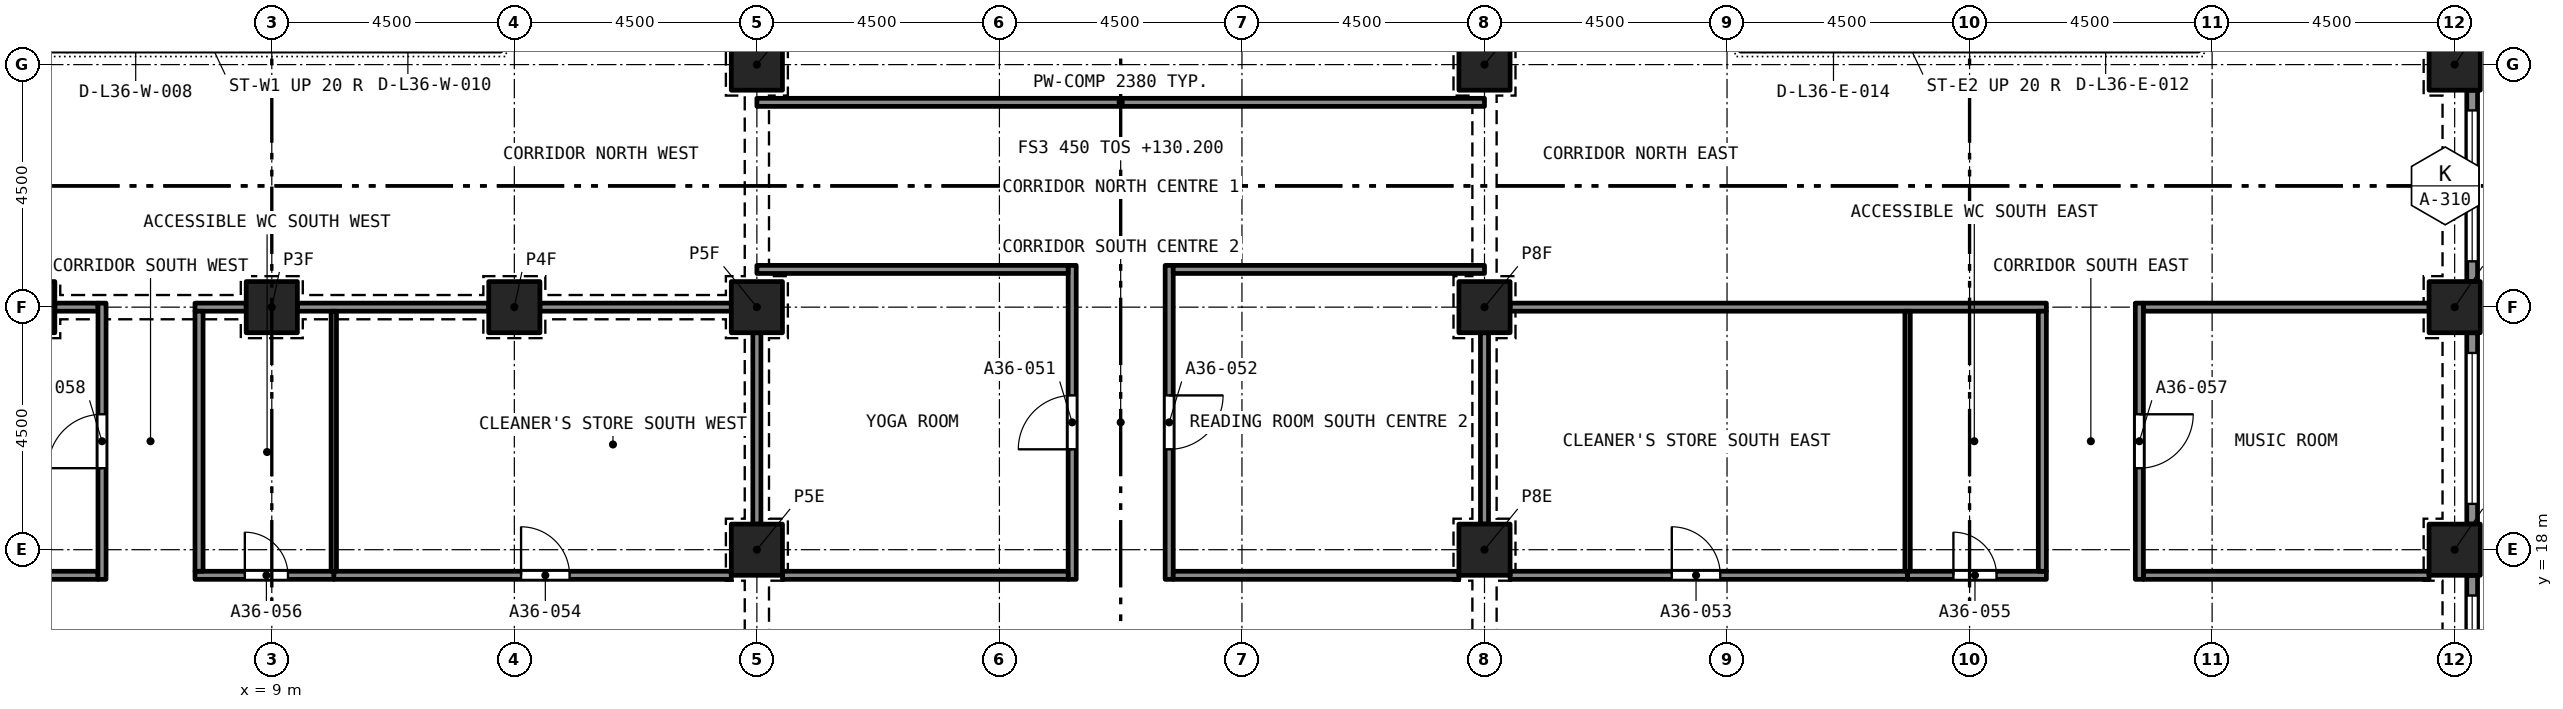
"""IFC4 building model, lengths in metres.
Left out: names, types, materials, properties, quantities, classifications, styles, units other than length and angle.
Written with IfcOpenShell. Run it as: python <this file> out.ifc"""

import sys

from ifc_helpers import new_model, si_unit, direction, frame, frame_2d, origin, origin_2d, place, context, subcontext, project, spatial, rectangle, extrude, element, fill, save


model = new_model("IFC4")
c1 = context("Model", 3, precision=1e-05, world=origin(), true_north=direction((0.0, 1.0)))
c2 = subcontext(c1, "Body", "Model", "MODEL_VIEW")
j1 = project(units=[si_unit("LENGTHUNIT", "METRE"), si_unit("PLANEANGLEUNIT", "RADIAN")], contexts=[c1])
p1 = place(None, origin())
s1 = spatial("IfcSite", under=j1, at=p1, CompositionType="ELEMENT")
p2 = place(p1, origin())
s2 = spatial("IfcBuilding", under=s1, at=p2, CompositionType="ELEMENT")
p3 = place(p2, frame((0.0, 0.0, 130.2)))
s3 = spatial("IfcBuildingStorey", under=s2, at=p3, CompositionType="ELEMENT", Elevation=130.2)
for number, where, z_axis, x_axis in (
    (1, (18.0, 18.0, 0.0), (0.0, 0.0, 1.0), (1.0, 0.0, 0.0)),
    (2, (31.5, 18.0, 0.0), (0.0, 0.0, 1.0), (1.0, 0.0, 0.0)),
    (3, (49.5, 18.0, 0.0), (0.0, 0.0, 1.0), (1.0, 0.0, 0.0)),
    (4, (4.5, 22.5, 0.0), (0.0, 0.0, 1.0), (1.0, 0.0, 0.0)),
    (5, (9.0, 22.5, 0.0), (0.0, 0.0, 1.0), (1.0, 0.0, 0.0)),
    (6, (13.5, 22.5, 0.0), (0.0, 0.0, 1.0), (1.0, 0.0, 0.0)),
    (7, (18.0, 22.5, 0.0), (0.0, 0.0, 1.0), (1.0, 0.0, 0.0)),
    (8, (31.5, 22.5, 0.0), (0.0, 0.0, 1.0), (1.0, 0.0, 0.0)),
    (9, (49.5, 22.5, 0.0), (0.0, 0.0, 1.0), (1.0, 0.0, 0.0)),
    (10, (18.0, 27.0, 0.0), (0.0, 0.0, 1.0), (1.0, 0.0, 0.0)),
    (11, (31.5, 27.0, 0.0), (0.0, 0.0, 1.0), (1.0, 0.0, 0.0)),
    (12, (49.5, 27.0, 0.0), (0.0, 0.0, 1.0), (1.0, 0.0, 0.0)),
):
    element("IfcColumn", number, at=place(p3, frame(where, z_axis=z_axis, x_axis=x_axis)), inside=s3, PredefinedType="COLUMN", context=c2, shape_type="SweptSolid", body=[
        extrude(rectangle(XDim=0.95, YDim=0.95, at=origin_2d()), origin(), (0.0, 0.0, 1.0), 3.2),
    ])
p4 = place(p3, frame((49.825, 17.525, 0.0), z_axis=(0.0, 0.0, 1.0), x_axis=(0.0, -1.0, 0.0)))
e13 = element("IfcWall", 13, at=p4, inside=s3, PredefinedType="SOLIDWALL", context=c2, shape_type="SweptSolid", body=[
    extrude(rectangle(XDim=3.55, YDim=0.2, at=frame_2d((1.775, 0.0))), origin(), (0.0, 0.0, 1.0), 3.2),
])
p5 = place(p4, frame((0.375, 0.0, 0.45)))
e14 = element("IfcOpeningElement", 14, at=p5, cuts=e13, PredefinedType="OPENING", context=c2, shape_type="SweptSolid", body=[
    extrude(rectangle(XDim=2.8, YDim=1.95, at=frame_2d((1.4, 0.975))), frame((0.0, 0.11, 0.0), z_axis=(0.0, -1.0, 0.0), x_axis=(1.0, 0.0, 0.0)), (0.0, 0.0, 1.0), 0.22),
])
p6 = place(p3, frame((49.825, 22.025, 0.0), z_axis=(0.0, 0.0, 1.0), x_axis=(0.0, -1.0, 0.0)))
e15 = element("IfcWall", 15, at=p6, inside=s3, PredefinedType="SOLIDWALL", context=c2, shape_type="SweptSolid", body=[
    extrude(rectangle(XDim=3.55, YDim=0.2, at=frame_2d((1.775, 0.0))), origin(), (0.0, 0.0, 1.0), 3.2),
])
p7 = place(p6, frame((0.375, 0.0, 0.45)))
e16 = element("IfcOpeningElement", 16, at=p7, cuts=e15, PredefinedType="OPENING", context=c2, shape_type="SweptSolid", body=[
    extrude(rectangle(XDim=2.8, YDim=1.95, at=frame_2d((1.4, 0.975))), frame((0.0, 0.11, 0.0), z_axis=(0.0, -1.0, 0.0), x_axis=(1.0, 0.0, 0.0)), (0.0, 0.0, 1.0), 0.22),
])
p8 = place(p3, frame((49.825, 26.525, 0.0), z_axis=(0.0, 0.0, 1.0), x_axis=(0.0, -1.0, 0.0)))
e17 = element("IfcWall", 17, at=p8, inside=s3, PredefinedType="SOLIDWALL", context=c2, shape_type="SweptSolid", body=[
    extrude(rectangle(XDim=3.55, YDim=0.2, at=frame_2d((1.775, 0.0))), origin(), (0.0, 0.0, 1.0), 3.2),
])
p9 = place(p8, frame((0.375, 0.0, 0.45)))
e18 = element("IfcOpeningElement", 18, at=p9, cuts=e17, PredefinedType="OPENING", context=c2, shape_type="SweptSolid", body=[
    extrude(rectangle(XDim=2.8, YDim=1.95, at=frame_2d((1.4, 0.975))), frame((0.0, 0.11, 0.0), z_axis=(0.0, -1.0, 0.0), x_axis=(1.0, 0.0, 0.0)), (0.0, 0.0, 1.0), 0.22),
])
p10 = place(p3, frame((23.85, 17.45, 0.0), z_axis=(0.0, 0.0, 1.0), x_axis=(0.0, 1.0, 0.0)))
e19 = element("IfcWall", 19, at=p10, inside=s3, PredefinedType="PARTITIONING", context=c2, shape_type="SweptSolid", body=[
    extrude(rectangle(XDim=5.825, YDim=0.15, at=frame_2d((2.913, 0.0))), origin(), (0.0, 0.0, 1.0), 2.75),
])
p11 = place(p10, frame((2.413, 0.0, 0.0)))
e20 = element("IfcOpeningElement", 20, at=p11, cuts=e19, PredefinedType="OPENING", context=c2, shape_type="SweptSolid", body=[
    extrude(rectangle(XDim=1.0, YDim=2.1, at=frame_2d((0.5, 1.05))), frame((0.0, 0.085, 0.0), z_axis=(0.0, -1.0, 0.0), x_axis=(1.0, 0.0, 0.0)), (0.0, 0.0, 1.0), 0.17),
])
p12 = place(p3, frame((25.65, 23.275, 0.0), z_axis=(0.0, 0.0, 1.0), x_axis=(0.0, -1.0, 0.0)))
e21 = element("IfcWall", 21, at=p12, inside=s3, PredefinedType="PARTITIONING", context=c2, shape_type="SweptSolid", body=[
    extrude(rectangle(XDim=5.825, YDim=0.15, at=frame_2d((2.913, 0.0))), origin(), (0.0, 0.0, 1.0), 2.75),
])
p13 = place(p12, frame((2.413, 0.0, 0.0)))
e22 = element("IfcOpeningElement", 22, at=p13, cuts=e21, PredefinedType="OPENING", context=c2, shape_type="SweptSolid", body=[
    extrude(rectangle(XDim=1.0, YDim=2.1, at=frame_2d((0.5, 1.05))), frame((0.0, 0.085, 0.0), z_axis=(0.0, -1.0, 0.0), x_axis=(1.0, 0.0, 0.0)), (0.0, 0.0, 1.0), 0.17),
])
for number, where, z_axis, x_axis in (
    (23, (18.475, 17.525, 0.0), (0.0, 0.0, 1.0), (1.0, 0.0, 0.0)),
    (24, (25.725, 17.525, 0.0), (0.0, 0.0, 1.0), (1.0, 0.0, 0.0)),
):
    element("IfcWall", number, at=place(p3, frame(where, z_axis=z_axis, x_axis=x_axis)), inside=s3, PredefinedType="PARTITIONING", context=c2, shape_type="SweptSolid", body=[
        extrude(rectangle(XDim=5.3, YDim=0.15, at=frame_2d((2.65, 0.0))), origin(), (0.0, 0.0, 1.0), 2.75),
    ])
p14 = place(p3, frame((31.975, 17.525, 0.0), z_axis=(0.0, 0.0, 1.0), x_axis=(1.0, 0.0, 0.0)))
e25 = element("IfcWall", 25, at=p14, inside=s3, PredefinedType="PARTITIONING", context=c2, shape_type="SweptSolid", body=[
    extrude(rectangle(XDim=7.375, YDim=0.15, at=frame_2d((3.688, 0.0))), origin(), (0.0, 0.0, 1.0), 2.9),
])
p15 = place(p14, frame((3.0, 0.0, 0.0)))
e26 = element("IfcOpeningElement", 26, at=p15, cuts=e25, PredefinedType="OPENING", context=c2, shape_type="SweptSolid", body=[
    extrude(rectangle(XDim=0.9, YDim=2.1, at=frame_2d((0.45, 1.05))), frame((0.0, 0.085, 0.0), z_axis=(0.0, -1.0, 0.0), x_axis=(1.0, 0.0, 0.0)), (0.0, 0.0, 1.0), 0.17),
])
p16 = place(p3, frame((10.15, 17.525, 0.0), z_axis=(0.0, 0.0, 1.0), x_axis=(1.0, 0.0, 0.0)))
e27 = element("IfcWall", 27, at=p16, inside=s3, PredefinedType="PARTITIONING", context=c2, shape_type="SweptSolid", body=[
    extrude(rectangle(XDim=7.375, YDim=0.15, at=frame_2d((3.688, 0.0))), origin(), (0.0, 0.0, 1.0), 2.9),
])
p17 = place(p16, frame((3.475, 0.0, 0.0)))
e28 = element("IfcOpeningElement", 28, at=p17, cuts=e27, PredefinedType="OPENING", context=c2, shape_type="SweptSolid", body=[
    extrude(rectangle(XDim=0.9, YDim=2.1, at=frame_2d((0.45, 1.05))), frame((0.0, 0.085, 0.0), z_axis=(0.0, -1.0, 0.0), x_axis=(1.0, 0.0, 0.0)), (0.0, 0.0, 1.0), 0.17),
])
p18 = place(p3, frame((39.35, 17.525, 0.0), z_axis=(0.0, 0.0, 1.0), x_axis=(1.0, 0.0, 0.0)))
e29 = element("IfcWall", 29, at=p18, inside=s3, PredefinedType="PARTITIONING", context=c2, shape_type="SweptSolid", body=[
    extrude(rectangle(XDim=2.575, YDim=0.15, at=frame_2d((1.288, 0.0))), origin(), (0.0, 0.0, 1.0), 2.9),
])
p19 = place(p18, frame((0.85, 0.0, 0.0)))
e30 = element("IfcOpeningElement", 30, at=p19, cuts=e29, PredefinedType="OPENING", context=c2, shape_type="SweptSolid", body=[
    extrude(rectangle(XDim=0.8, YDim=2.1, at=frame_2d((0.4, 1.05))), frame((0.0, 0.085, 0.0), z_axis=(0.0, -1.0, 0.0), x_axis=(1.0, 0.0, 0.0)), (0.0, 0.0, 1.0), 0.17),
])
p20 = place(p3, frame((7.575, 17.525, 0.0), z_axis=(0.0, 0.0, 1.0), x_axis=(1.0, 0.0, 0.0)))
e31 = element("IfcWall", 31, at=p20, inside=s3, PredefinedType="PARTITIONING", context=c2, shape_type="SweptSolid", body=[
    extrude(rectangle(XDim=2.575, YDim=0.15, at=frame_2d((1.288, 0.0))), origin(), (0.0, 0.0, 1.0), 2.9),
])
p21 = place(p20, frame((0.925, 0.0, 0.0)))
e32 = element("IfcOpeningElement", 32, at=p21, cuts=e31, PredefinedType="OPENING", context=c2, shape_type="SweptSolid", body=[
    extrude(rectangle(XDim=0.8, YDim=2.1, at=frame_2d((0.4, 1.05))), frame((0.0, 0.085, 0.0), z_axis=(0.0, -1.0, 0.0), x_axis=(1.0, 0.0, 0.0)), (0.0, 0.0, 1.0), 0.17),
])
for number, where, z_axis, x_axis in (
    (33, (43.725, 17.525, 0.0), (0.0, 0.0, 1.0), (1.0, 0.0, 0.0)),
    (34, (0.475, 17.525, 0.0), (0.0, 0.0, 1.0), (1.0, 0.0, 0.0)),
):
    element("IfcWall", number, at=place(p3, frame(where, z_axis=z_axis, x_axis=x_axis)), inside=s3, PredefinedType="PARTITIONING", context=c2, shape_type="SweptSolid", body=[
        extrude(rectangle(XDim=5.3, YDim=0.15, at=frame_2d((2.65, 0.0))), origin(), (0.0, 0.0, 1.0), 2.9),
    ])
p22 = place(p3, frame((18.0, 26.3, 0.0), z_axis=(0.0, 0.0, 1.0), x_axis=(1.0, 0.0, 0.0)))
e35 = element("IfcWall", 35, at=p22, inside=s3, PredefinedType="PARTITIONING", context=c2, shape_type="SweptSolid", body=[
    extrude(rectangle(XDim=13.5, YDim=0.15, at=frame_2d((6.75, 0.0))), origin(), (0.0, 0.0, 1.0), 2.38),
])
p23 = place(p3, frame((18.0, 23.2, 0.0), z_axis=(0.0, 0.0, 1.0), x_axis=(1.0, 0.0, 0.0)))
e36 = element("IfcWall", 36, at=p23, inside=s3, PredefinedType="PARTITIONING", context=c2, shape_type="SweptSolid", body=[
    extrude(rectangle(XDim=5.775, YDim=0.15, at=frame_2d((2.887, 0.0))), origin(), (0.0, 0.0, 1.0), 2.75),
])
p24 = place(p3, frame((18.0, 18.475, 0.0), z_axis=(0.0, 0.0, 1.0), x_axis=(0.0, 1.0, 0.0)))
e37 = element("IfcWall", 37, at=p24, inside=s3, PredefinedType="PARTITIONING", context=c2, shape_type="SweptSolid", body=[
    extrude(rectangle(XDim=3.55, YDim=0.15, at=frame_2d((1.775, 0.0))), origin(), (0.0, 0.0, 1.0), 2.38),
])
p25 = place(p3, frame((25.725, 23.2, 0.0), z_axis=(0.0, 0.0, 1.0), x_axis=(1.0, 0.0, 0.0)))
e38 = element("IfcWall", 38, at=p25, inside=s3, PredefinedType="PARTITIONING", context=c2, shape_type="SweptSolid", body=[
    extrude(rectangle(XDim=5.775, YDim=0.15, at=frame_2d((2.887, 0.0))), origin(), (0.0, 0.0, 1.0), 2.75),
])
p26 = place(p3, frame((31.5, 18.475, 0.0), z_axis=(0.0, 0.0, 1.0), x_axis=(0.0, 1.0, 0.0)))
e39 = element("IfcWall", 39, at=p26, inside=s3, PredefinedType="PARTITIONING", context=c2, shape_type="SweptSolid", body=[
    extrude(rectangle(XDim=3.55, YDim=0.15, at=frame_2d((1.775, 0.0))), origin(), (0.0, 0.0, 1.0), 2.38),
])
p27 = place(p3, frame((31.975, 22.5, 0.0), z_axis=(0.0, 0.0, 1.0), x_axis=(1.0, 0.0, 0.0)))
e40 = element("IfcWall", 40, at=p27, inside=s3, PredefinedType="PARTITIONING", context=c2, shape_type="SweptSolid", body=[
    extrude(rectangle(XDim=9.95, YDim=0.15, at=frame_2d((4.975, 0.0))), origin(), (0.0, 0.0, 1.0), 2.9),
])
p28 = place(p3, frame((43.725, 22.5, 0.0), z_axis=(0.0, 0.0, 1.0), x_axis=(1.0, 0.0, 0.0)))
e41 = element("IfcWall", 41, at=p28, inside=s3, PredefinedType="PARTITIONING", context=c2, shape_type="SweptSolid", body=[
    extrude(rectangle(XDim=5.3, YDim=0.15, at=frame_2d((2.65, 0.0))), origin(), (0.0, 0.0, 1.0), 2.9),
])
for number, where, z_axis, x_axis in (
    (42, (13.975, 22.5, 0.0), (0.0, 0.0, 1.0), (1.0, 0.0, 0.0)),
    (43, (9.475, 22.5, 0.0), (0.0, 0.0, 1.0), (1.0, 0.0, 0.0)),
):
    element("IfcWall", number, at=place(p3, frame(where, z_axis=z_axis, x_axis=x_axis)), inside=s3, PredefinedType="PARTITIONING", context=c2, shape_type="SweptSolid", body=[
        extrude(rectangle(XDim=3.55, YDim=0.15, at=frame_2d((1.775, 0.0))), origin(), (0.0, 0.0, 1.0), 2.38),
    ])
p29 = place(p3, frame((7.575, 22.5, 0.0), z_axis=(0.0, 0.0, 1.0), x_axis=(1.0, 0.0, 0.0)))
e44 = element("IfcWall", 44, at=p29, inside=s3, PredefinedType="PARTITIONING", context=c2, shape_type="SweptSolid", body=[
    extrude(rectangle(XDim=0.95, YDim=0.15, at=frame_2d((0.475, 0.0))), origin(), (0.0, 0.0, 1.0), 2.38),
])
p30 = place(p3, frame((4.975, 22.5, 0.0), z_axis=(0.0, 0.0, 1.0), x_axis=(1.0, 0.0, 0.0)))
e45 = element("IfcWall", 45, at=p30, inside=s3, PredefinedType="PARTITIONING", context=c2, shape_type="SweptSolid", body=[
    extrude(rectangle(XDim=0.8, YDim=0.15, at=frame_2d((0.4, 0.0))), origin(), (0.0, 0.0, 1.0), 2.38),
])
p31 = place(p3, frame((41.85, 17.6, 0.0), z_axis=(0.0, 0.0, 1.0), x_axis=(0.0, 1.0, 0.0)))
e46 = element("IfcWall", 46, at=p31, inside=s3, PredefinedType="PARTITIONING", context=c2, shape_type="SweptSolid", body=[
    extrude(rectangle(XDim=4.825, YDim=0.15, at=frame_2d((2.413, 0.0))), origin(), (0.0, 0.0, 1.0), 2.9),
])
p32 = place(p3, frame((43.65, 22.575, 0.0), z_axis=(0.0, 0.0, 1.0), x_axis=(0.0, -1.0, 0.0)))
e47 = element("IfcWall", 47, at=p32, inside=s3, PredefinedType="PARTITIONING", context=c2, shape_type="SweptSolid", body=[
    extrude(rectangle(XDim=5.125, YDim=0.15, at=frame_2d((2.562, 0.0))), origin(), (0.0, 0.0, 1.0), 2.9),
])
p33 = place(p32, frame((2.062, 0.0, 0.0)))
e48 = element("IfcOpeningElement", 48, at=p33, cuts=e47, PredefinedType="OPENING", context=c2, shape_type="SweptSolid", body=[
    extrude(rectangle(XDim=1.0, YDim=2.1, at=frame_2d((0.5, 1.05))), frame((0.0, 0.085, 0.0), z_axis=(0.0, -1.0, 0.0), x_axis=(1.0, 0.0, 0.0)), (0.0, 0.0, 1.0), 0.17),
])
p34 = place(p3, frame((7.65, 17.6, 0.0), z_axis=(0.0, 0.0, 1.0), x_axis=(0.0, 1.0, 0.0)))
e49 = element("IfcWall", 49, at=p34, inside=s3, PredefinedType="PARTITIONING", context=c2, shape_type="SweptSolid", body=[
    extrude(rectangle(XDim=4.825, YDim=0.15, at=frame_2d((2.413, 0.0))), origin(), (0.0, 0.0, 1.0), 2.9),
])
p35 = place(p3, frame((5.85, 17.45, 0.0), z_axis=(0.0, 0.0, 1.0), x_axis=(0.0, 1.0, 0.0)))
e50 = element("IfcWall", 50, at=p35, inside=s3, PredefinedType="PARTITIONING", context=c2, shape_type="SweptSolid", body=[
    extrude(rectangle(XDim=5.125, YDim=0.15, at=frame_2d((2.562, 0.0))), origin(), (0.0, 0.0, 1.0), 2.9),
])
p36 = place(p35, frame((2.062, 0.0, 0.0)))
e51 = element("IfcOpeningElement", 51, at=p36, cuts=e50, PredefinedType="OPENING", context=c2, shape_type="SweptSolid", body=[
    extrude(rectangle(XDim=1.0, YDim=2.1, at=frame_2d((0.5, 1.05))), frame((0.0, 0.085, 0.0), z_axis=(0.0, -1.0, 0.0), x_axis=(1.0, 0.0, 0.0)), (0.0, 0.0, 1.0), 0.17),
])
for number, where, z_axis, x_axis in (
    (52, (39.35, 17.6, 0.0), (0.0, 0.0, 1.0), (0.0, 1.0, 0.0)),
    (53, (10.15, 17.6, 0.0), (0.0, 0.0, 1.0), (0.0, 1.0, 0.0)),
):
    element("IfcWall", number, at=place(p3, frame(where, z_axis=z_axis, x_axis=x_axis)), inside=s3, PredefinedType="PARTITIONING", context=c2, shape_type="SweptSolid", body=[
        extrude(rectangle(XDim=4.825, YDim=0.1, at=frame_2d((2.413, 0.0))), origin(), (0.0, 0.0, 1.0), 2.9),
    ])
p37 = place(p5, origin())
e54 = element("IfcWindow", 54, at=p37, inside=s3, PartitioningType="SINGLE_PANEL", PredefinedType="WINDOW", context=c2, shape_type="SweptSolid", body=[
    extrude(rectangle(XDim=2.8, YDim=1.95, at=frame_2d((1.4, 0.975))), frame((0.0, 0.03, 0.0), z_axis=(0.0, -1.0, 0.0), x_axis=(1.0, 0.0, 0.0)), (0.0, 0.0, 1.0), 0.06),
])
fill(e14, e54)
p38 = place(p7, origin())
e55 = element("IfcWindow", 55, at=p38, inside=s3, PartitioningType="SINGLE_PANEL", PredefinedType="WINDOW", context=c2, shape_type="SweptSolid", body=[
    extrude(rectangle(XDim=2.8, YDim=1.95, at=frame_2d((1.4, 0.975))), frame((0.0, 0.03, 0.0), z_axis=(0.0, -1.0, 0.0), x_axis=(1.0, 0.0, 0.0)), (0.0, 0.0, 1.0), 0.06),
])
fill(e16, e55)
p39 = place(p9, origin())
e56 = element("IfcWindow", 56, at=p39, inside=s3, PartitioningType="SINGLE_PANEL", PredefinedType="WINDOW", context=c2, shape_type="SweptSolid", body=[
    extrude(rectangle(XDim=2.8, YDim=1.95, at=frame_2d((1.4, 0.975))), frame((0.0, 0.03, 0.0), z_axis=(0.0, -1.0, 0.0), x_axis=(1.0, 0.0, 0.0)), (0.0, 0.0, 1.0), 0.06),
])
fill(e18, e56)
p40 = place(p11, origin())
e57 = element("IfcDoor", 57, at=p40, inside=s3, OperationType="SINGLE_SWING_LEFT", PredefinedType="DOOR", context=c2, shape_type="SweptSolid", body=[
    extrude(rectangle(XDim=1.0, YDim=2.1, at=frame_2d((0.5, 1.05))), frame((0.0, 0.025, 0.0), z_axis=(0.0, -1.0, 0.0), x_axis=(1.0, 0.0, 0.0)), (0.0, 0.0, 1.0), 0.05),
])
fill(e20, e57)
p41 = place(p13, origin())
e58 = element("IfcDoor", 58, at=p41, inside=s3, OperationType="SINGLE_SWING_RIGHT", PredefinedType="DOOR", context=c2, shape_type="SweptSolid", body=[
    extrude(rectangle(XDim=1.0, YDim=2.1, at=frame_2d((0.5, 1.05))), frame((0.0, 0.025, 0.0), z_axis=(0.0, -1.0, 0.0), x_axis=(1.0, 0.0, 0.0)), (0.0, 0.0, 1.0), 0.05),
])
fill(e22, e58)
p42 = place(p15, origin())
e59 = element("IfcDoor", 59, at=p42, inside=s3, OperationType="SINGLE_SWING_LEFT", PredefinedType="DOOR", context=c2, shape_type="SweptSolid", body=[
    extrude(rectangle(XDim=0.9, YDim=2.1, at=frame_2d((0.45, 1.05))), frame((0.0, 0.025, 0.0), z_axis=(0.0, -1.0, 0.0), x_axis=(1.0, 0.0, 0.0)), (0.0, 0.0, 1.0), 0.05),
])
fill(e26, e59)
p43 = place(p17, origin())
e60 = element("IfcDoor", 60, at=p43, inside=s3, OperationType="SINGLE_SWING_RIGHT", PredefinedType="DOOR", context=c2, shape_type="SweptSolid", body=[
    extrude(rectangle(XDim=0.9, YDim=2.1, at=frame_2d((0.45, 1.05))), frame((0.0, 0.025, 0.0), z_axis=(0.0, -1.0, 0.0), x_axis=(1.0, 0.0, 0.0)), (0.0, 0.0, 1.0), 0.05),
])
fill(e28, e60)
p44 = place(p19, origin())
e61 = element("IfcDoor", 61, at=p44, inside=s3, OperationType="SINGLE_SWING_LEFT", PredefinedType="DOOR", context=c2, shape_type="SweptSolid", body=[
    extrude(rectangle(XDim=0.8, YDim=2.1, at=frame_2d((0.4, 1.05))), frame((0.0, 0.025, 0.0), z_axis=(0.0, -1.0, 0.0), x_axis=(1.0, 0.0, 0.0)), (0.0, 0.0, 1.0), 0.05),
])
fill(e30, e61)
p45 = place(p21, origin())
e62 = element("IfcDoor", 62, at=p45, inside=s3, OperationType="SINGLE_SWING_RIGHT", PredefinedType="DOOR", context=c2, shape_type="SweptSolid", body=[
    extrude(rectangle(XDim=0.8, YDim=2.1, at=frame_2d((0.4, 1.05))), frame((0.0, 0.025, 0.0), z_axis=(0.0, -1.0, 0.0), x_axis=(1.0, 0.0, 0.0)), (0.0, 0.0, 1.0), 0.05),
])
fill(e32, e62)
p46 = place(p33, origin())
e63 = element("IfcDoor", 63, at=p46, inside=s3, OperationType="SINGLE_SWING_RIGHT", PredefinedType="DOOR", context=c2, shape_type="SweptSolid", body=[
    extrude(rectangle(XDim=1.0, YDim=2.1, at=frame_2d((0.5, 1.05))), frame((0.0, 0.025, 0.0), z_axis=(0.0, -1.0, 0.0), x_axis=(1.0, 0.0, 0.0)), (0.0, 0.0, 1.0), 0.05),
])
fill(e48, e63)
p47 = place(p36, origin())
e64 = element("IfcDoor", 64, at=p47, inside=s3, OperationType="SINGLE_SWING_RIGHT", PredefinedType="DOOR", context=c2, shape_type="SweptSolid", body=[
    extrude(rectangle(XDim=1.0, YDim=2.1, at=frame_2d((0.5, 1.05))), frame((0.0, 0.025, 0.0), z_axis=(0.0, -1.0, 0.0), x_axis=(1.0, 0.0, 0.0)), (0.0, 0.0, 1.0), 0.05),
])
fill(e51, e64)
save(model, sys.argv[1])
